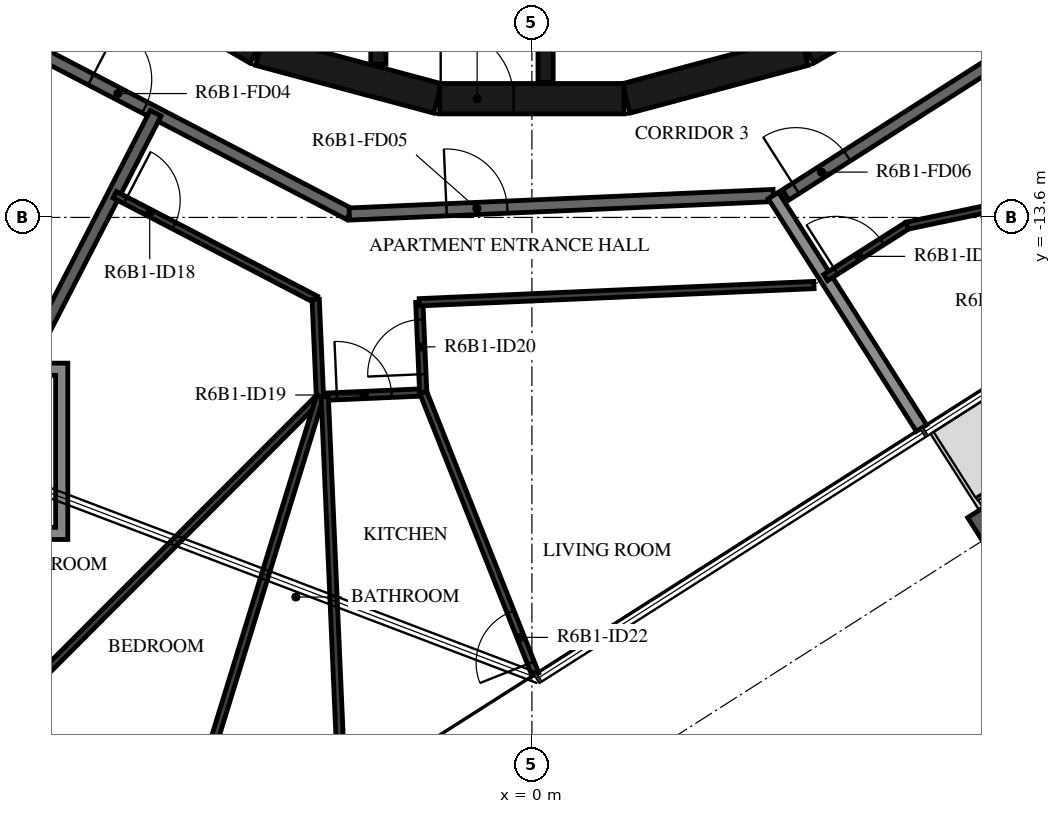
"""IFC4 building model, lengths in metres.
Left out: names, types, materials, properties, quantities, classifications, styles, units other than length and angle.
Written with IfcOpenShell. Run it as: python <this file> out.ifc"""

import sys

from ifc_helpers import new_model, si_unit, direction, frame, frame_2d, origin, origin_2d, place, context, subcontext, project, spatial, polyline, rectangle, i_section, outline, extrude, element, fill, save


model = new_model("IFC4")
c1 = context("Model", 3, precision=1e-05, world=origin(), true_north=direction((0.0, 1.0)))
c2 = subcontext(c1, "Body", "Model", "MODEL_VIEW")
j1 = project(units=[si_unit("LENGTHUNIT", "METRE"), si_unit("PLANEANGLEUNIT", "RADIAN")], contexts=[c1])
p1 = place(None, origin())
s1 = spatial("IfcSite", under=j1, at=p1, CompositionType="ELEMENT")
p2 = place(p1, origin())
s2 = spatial("IfcBuilding", under=s1, at=p2, CompositionType="ELEMENT")
p3 = place(p2, frame((0.0, 0.0, 237.2)))
s3 = spatial("IfcBuildingStorey", under=s2, at=p3, CompositionType="ELEMENT", Elevation=237.2)
p4 = place(p3, frame((7.535, -18.835, -0.38), z_axis=(0.0, 0.0, 1.0), x_axis=(-0.843391139633, -0.537300088953, 0.0)))
e1 = element("IfcColumn", 1, at=p4, inside=s3, PredefinedType="COLUMN", context=c2, shape_type="SweptSolid", body=[
    extrude(i_section(OverallWidth=0.3, OverallDepth=0.9, WebThickness=0.019, FlangeThickness=0.035, FilletRadius=0.03, at=origin_2d()), origin(), (0.0, 0.0, 1.0), 3.5),
])
p5 = place(p3, frame((1.55, -11.643, 0.0), z_axis=(0.0, 0.0, 1.0), x_axis=(0.965948410781, 0.258734743916, 0.0)))
e2 = element("IfcWall", 2, at=p5, inside=s3, PredefinedType="SHEAR", context=c2, shape_type="SweptSolid", body=[
    extrude(rectangle(XDim=3.033, YDim=0.5, at=frame_2d((1.516, 0.0))), origin(), (0.0, 0.0, 1.0), 3.12),
])
p6 = place(p3, frame((4.51, -10.845, 0.0), z_axis=(0.0, 0.0, 1.0), x_axis=(0.865975092491, 0.500087131594, 0.0)))
e3 = element("IfcWall", 3, at=p6, inside=s3, PredefinedType="SHEAR", context=c2, shape_type="SweptSolid", body=[
    extrude(rectangle(XDim=3.033, YDim=0.5, at=frame_2d((1.516, 0.0))), origin(), (0.0, 0.0, 1.0), 3.12),
])
p7 = place(p6, frame((1.066, 0.0, 0.0)))
e4 = element("IfcOpeningElement", 4, at=p7, cuts=e3, PredefinedType="OPENING", context=c2, shape_type="SweptSolid", body=[
    extrude(rectangle(XDim=0.9, YDim=2.1, at=frame_2d((0.45, 1.05))), frame((0.0, 0.26, 0.0), z_axis=(0.0, -1.0, 0.0), x_axis=(1.0, 0.0, 0.0)), (0.0, 0.0, 1.0), 0.52),
])
for number, where, z_axis, x_axis in (
    (5, (-7.137, -9.329, 0.0), (0.0, 0.0, 1.0), (0.866, -0.5, 0.0)),
    (6, (-4.479, -10.858, 0.0), (0.0, 0.0, 1.0), (0.966, -0.259, 0.0)),
):
    element("IfcWall", number, at=place(p3, frame(where, z_axis=z_axis, x_axis=x_axis)), inside=s3, PredefinedType="SHEAR", context=c2, shape_type="SweptSolid", body=[
        extrude(rectangle(XDim=3.033, YDim=0.5, at=frame_2d((1.516, 0.0))), origin(), (0.0, 0.0, 1.0), 3.12),
    ])
p8 = place(p3, frame((-1.516, -11.647, 0.0), z_axis=(0.0, 0.0, 1.0), x_axis=(1.0, 0.0, 0.0)))
e7 = element("IfcWall", 7, at=p8, inside=s3, PredefinedType="SHEAR", context=c2, shape_type="SweptSolid", body=[
    extrude(rectangle(XDim=3.033, YDim=0.5, at=frame_2d((1.516, 0.0))), origin(), (0.0, 0.0, 1.0), 3.12),
])
p9 = place(p8, frame((0.016, 0.0, 0.0)))
e8 = element("IfcOpeningElement", 8, at=p9, cuts=e7, PredefinedType="OPENING", context=c2, shape_type="SweptSolid", body=[
    extrude(rectangle(XDim=1.2, YDim=2.1, at=frame_2d((0.6, 1.05))), frame((0.0, 0.26, 0.0), z_axis=(0.0, -1.0, 0.0), x_axis=(1.0, 0.0, 0.0)), (0.0, 0.0, 1.0), 0.52),
])
p10 = place(p3, frame((-2.525, -8.97, 0.0), z_axis=(0.0, 0.0, 1.0), x_axis=(0.0, -1.0, 0.0)))
e9 = element("IfcWall", 9, at=p10, inside=s3, PredefinedType="SHEAR", context=c2, shape_type="SweptSolid", body=[
    extrude(rectangle(XDim=2.11, YDim=0.25, at=frame_2d((1.055, 0.0))), origin(), (0.0, 0.0, 1.0), 3.12),
])
p11 = place(p3, frame((0.225, -8.97, 0.0), z_axis=(0.0, 0.0, 1.0), x_axis=(0.0, -1.0, 0.0)))
e10 = element("IfcWall", 10, at=p11, inside=s3, PredefinedType="SHEAR", context=c2, shape_type="SweptSolid", body=[
    extrude(rectangle(XDim=2.41, YDim=0.25, at=frame_2d((1.205, 0.0))), origin(), (0.0, 0.0, 1.0), 3.12),
])
p12 = place(p3, frame((-9.372, -10.228, 0.0), z_axis=(0.0, 0.0, 1.0), x_axis=(0.887005184532, -0.461759464021, 0.0)))
e11 = element("IfcWall", 11, at=p12, inside=s3, PredefinedType="STANDARD", context=c2, shape_type="SweptSolid", body=[
    extrude(rectangle(XDim=7.181, YDim=0.2, at=frame_2d((3.591, 0.0))), origin(), (0.0, 0.0, 1.0), 3.12),
])
p13 = place(p12, frame((2.391, 0.0, 0.0)))
e12 = element("IfcOpeningElement", 12, at=p13, cuts=e11, PredefinedType="OPENING", context=c2, shape_type="SweptSolid", body=[
    extrude(rectangle(XDim=1.0, YDim=2.1, at=frame_2d((0.5, 1.05))), frame((0.0, 0.11, 0.0), z_axis=(0.0, -1.0, 0.0), x_axis=(1.0, 0.0, 0.0)), (0.0, 0.0, 1.0), 0.22),
])
p14 = place(p3, frame((-3.003, -13.544, 0.0), z_axis=(0.0, 0.0, 1.0), x_axis=(0.999048221872, 0.043619380718, 0.0)))
e13 = element("IfcWall", 13, at=p14, inside=s3, PredefinedType="STANDARD", context=c2, shape_type="SweptSolid", body=[
    extrude(rectangle(XDim=6.979, YDim=0.2, at=frame_2d((3.49, 0.0))), origin(), (0.0, 0.0, 1.0), 3.12),
])
p15 = place(p14, frame((1.6, 0.0, 0.0)))
e14 = element("IfcOpeningElement", 14, at=p15, cuts=e13, PredefinedType="OPENING", context=c2, shape_type="SweptSolid", body=[
    extrude(rectangle(XDim=1.0, YDim=2.1, at=frame_2d((0.5, 1.05))), frame((0.0, 0.11, 0.0), z_axis=(0.0, -1.0, 0.0), x_axis=(1.0, 0.0, 0.0)), (0.0, 0.0, 1.0), 0.22),
])
p16 = place(p3, frame((4.172, -13.231, 0.0), z_axis=(0.0, 0.0, 1.0), x_axis=(0.843388394728, 0.537304397561, 0.0)))
e15 = element("IfcWall", 15, at=p16, inside=s3, PredefinedType="STANDARD", context=c2, shape_type="SweptSolid", body=[
    extrude(rectangle(XDim=7.181, YDim=0.2, at=frame_2d((3.59, 0.0))), origin(), (0.0, 0.0, 1.0), 3.12),
])
p17 = place(p16, frame((0.2, 0.0, 0.0)))
e16 = element("IfcOpeningElement", 16, at=p17, cuts=e15, PredefinedType="OPENING", context=c2, shape_type="SweptSolid", body=[
    extrude(rectangle(XDim=1.0, YDim=2.1, at=frame_2d((0.5, 1.05))), frame((0.0, 0.11, 0.0), z_axis=(0.0, -1.0, 0.0), x_axis=(1.0, 0.0, 0.0)), (0.0, 0.0, 1.0), 0.22),
])
p18 = place(p3, frame((-8.303, -15.996, 0.0), z_axis=(0.0, 0.0, 1.0), x_axis=(0.457702371186, 0.889105471477, 0.0)))
e17 = element("IfcWall", 17, at=p18, inside=s3, PredefinedType="STANDARD", context=c2, shape_type="SweptSolid", body=[
    extrude(rectangle(XDim=4.623, YDim=0.2, at=frame_2d((2.312, 0.0))), origin(), (0.0, 0.0, 1.0), 3.12),
])
p19 = place(p3, frame((6.407, -17.064, 0.0), z_axis=(0.0, 0.0, 1.0), x_axis=(-0.537324777979, 0.843375410461, 0.0)))
e18 = element("IfcWall", 18, at=p19, inside=s3, PredefinedType="STANDARD", context=c2, shape_type="SweptSolid", body=[
    extrude(rectangle(XDim=4.535, YDim=0.2, at=frame_2d((2.268, 0.0))), origin(), (0.0, 0.0, 1.0), 2.73),
])
p20 = place(p3, frame((-6.861, -13.226, 0.0), z_axis=(0.0, 0.0, 1.0), x_axis=(0.887010791097, -0.461748694073, 0.0)))
e19 = element("IfcWall", 19, at=p20, inside=s3, PredefinedType="PARTITIONING", context=c2, shape_type="SweptSolid", body=[
    extrude(rectangle(XDim=3.727, YDim=0.12, at=frame_2d((1.864, 0.0))), origin(), (0.0, 0.0, 1.0), 3.12),
])
p21 = place(p20, frame((0.2, 0.0, 0.0)))
e20 = element("IfcOpeningElement", 20, at=p21, cuts=e19, PredefinedType="OPENING", context=c2, shape_type="SweptSolid", body=[
    extrude(rectangle(XDim=0.9, YDim=2.1, at=frame_2d((0.45, 1.05))), frame((0.0, 0.07, 0.0), z_axis=(0.0, -1.0, 0.0), x_axis=(1.0, 0.0, 0.0)), (0.0, 0.0, 1.0), 0.14),
])
p22 = place(p3, frame((-3.555, -14.947, 0.0), z_axis=(0.0, 0.0, 1.0), x_axis=(0.043470204022, -0.999054723908, 0.0)))
e21 = element("IfcWall", 21, at=p22, inside=s3, PredefinedType="PARTITIONING", context=c2, shape_type="SweptSolid", body=[
    extrude(rectangle(XDim=1.606, YDim=0.12, at=frame_2d((0.803, 0.0))), origin(), (0.0, 0.0, 1.0), 3.12),
])
p23 = place(p3, frame((-3.407, -16.548, 0.0), z_axis=(0.0, 0.0, 1.0), x_axis=(0.999045901572, 0.043672491929, 0.0)))
e22 = element("IfcWall", 22, at=p23, inside=s3, PredefinedType="PARTITIONING", context=c2, shape_type="SweptSolid", body=[
    extrude(rectangle(XDim=1.621, YDim=0.12, at=frame_2d((0.811, 0.0))), origin(), (0.0, 0.0, 1.0), 3.12),
])
p24 = place(p23, frame((0.2, 0.0, 0.0)))
e23 = element("IfcOpeningElement", 23, at=p24, cuts=e22, PredefinedType="OPENING", context=c2, shape_type="SweptSolid", body=[
    extrude(rectangle(XDim=0.9, YDim=2.1, at=frame_2d((0.45, 1.05))), frame((0.0, 0.07, 0.0), z_axis=(0.0, -1.0, 0.0), x_axis=(1.0, 0.0, 0.0)), (0.0, 0.0, 1.0), 0.14),
])
p25 = place(p3, frame((-1.787, -16.478, 0.0), z_axis=(0.0, 0.0, 1.0), x_axis=(-0.043601447011, 0.999049004713, 0.0)))
e24 = element("IfcWall", 24, at=p25, inside=s3, PredefinedType="PARTITIONING", context=c2, shape_type="SweptSolid", body=[
    extrude(rectangle(XDim=1.484, YDim=0.12, at=frame_2d((0.742, 0.0))), origin(), (0.0, 0.0, 1.0), 3.12),
])
p26 = place(p25, frame((0.3, 0.0, 0.0)))
e25 = element("IfcOpeningElement", 25, at=p26, cuts=e24, PredefinedType="OPENING", context=c2, shape_type="SweptSolid", body=[
    extrude(rectangle(XDim=0.9, YDim=2.1, at=frame_2d((0.45, 1.05))), frame((0.0, 0.07, 0.0), z_axis=(0.0, -1.0, 0.0), x_axis=(1.0, 0.0, 0.0)), (0.0, 0.0, 1.0), 0.14),
])
p27 = place(p3, frame((-1.852, -14.995, 0.0), z_axis=(0.0, 0.0, 1.0), x_axis=(0.999047773092, 0.043629658249, 0.0)))
e26 = element("IfcWall", 26, at=p27, inside=s3, PredefinedType="PARTITIONING", context=c2, shape_type="SweptSolid", body=[
    extrude(rectangle(XDim=6.497, YDim=0.12, at=frame_2d((3.248, 0.0))), origin(), (0.0, 0.0, 1.0), 3.12),
])
p28 = place(p3, frame((-11.862, -24.94, 0.0), z_axis=(0.0, 0.0, 1.0), x_axis=(0.70663293894, 0.707580306117, 0.0)))
e27 = element("IfcWall", 27, at=p28, inside=s3, PredefinedType="PARTITIONING", context=c2, shape_type="SweptSolid", body=[
    extrude(rectangle(XDim=11.854, YDim=0.12, at=frame_2d((5.927, 0.0))), origin(), (0.0, 0.0, 1.0), 3.12),
])
p29 = place(p28, frame((1.9, 0.0, 0.0)))
e28 = element("IfcOpeningElement", 28, at=p29, cuts=e27, PredefinedType="OPENING", context=c2, shape_type="SweptSolid", body=[
    extrude(rectangle(XDim=0.9, YDim=2.1, at=frame_2d((0.45, 1.05))), frame((0.0, 0.07, 0.0), z_axis=(0.0, -1.0, 0.0), x_axis=(1.0, 0.0, 0.0)), (0.0, 0.0, 1.0), 0.14),
])
p30 = place(p3, frame((-6.026, -24.795, 0.0), z_axis=(0.0, 0.0, 1.0), x_axis=(0.294501505058, 0.955651015548, 0.0)))
e29 = element("IfcWall", 29, at=p30, inside=s3, PredefinedType="PARTITIONING", context=c2, shape_type="SweptSolid", body=[
    extrude(rectangle(XDim=8.626, YDim=0.12, at=frame_2d((4.313, 0.0))), origin(), (0.0, 0.0, 1.0), 3.12),
])
p31 = place(p30, frame((0.7, 0.0, 0.0)))
e30 = element("IfcOpeningElement", 30, at=p31, cuts=e29, PredefinedType="OPENING", context=c2, shape_type="SweptSolid", body=[
    extrude(rectangle(XDim=0.8, YDim=2.1, at=frame_2d((0.4, 1.05))), frame((0.0, 0.07, 0.0), z_axis=(0.0, -1.0, 0.0), x_axis=(1.0, 0.0, 0.0)), (0.0, 0.0, 1.0), 0.14),
])
p32 = place(p3, frame((-3.119, -23.133, 0.0), z_axis=(0.0, 0.0, 1.0), x_axis=(-0.043633326708, 0.99904761288, 0.0)))
e31 = element("IfcWall", 31, at=p32, inside=s3, PredefinedType="PARTITIONING", context=c2, shape_type="SweptSolid", body=[
    extrude(rectangle(XDim=6.591, YDim=0.12, at=frame_2d((3.296, 0.0))), origin(), (0.0, 0.0, 1.0), 3.12),
])
p33 = place(p3, frame((0.056, -21.11, 0.0), z_axis=(0.0, 0.0, 1.0), x_axis=(-0.369701541807, 0.929150563679, 0.0)))
e32 = element("IfcWall", 32, at=p33, inside=s3, PredefinedType="PARTITIONING", context=c2, shape_type="SweptSolid", body=[
    extrude(rectangle(XDim=4.986, YDim=0.12, at=frame_2d((2.493, 0.0))), origin(), (0.0, 0.0, 1.0), 2.73),
])
p34 = place(p33, frame((0.2, 0.0, 0.0)))
e33 = element("IfcOpeningElement", 33, at=p34, cuts=e32, PredefinedType="OPENING", context=c2, shape_type="SweptSolid", body=[
    extrude(rectangle(XDim=0.9, YDim=2.1, at=frame_2d((0.45, 1.05))), frame((0.0, 0.07, 0.0), z_axis=(0.0, -1.0, 0.0), x_axis=(1.0, 0.0, 0.0)), (0.0, 0.0, 1.0), 0.14),
])
p35 = place(p3, frame((4.83, -14.59, 0.0), z_axis=(0.0, 0.0, 1.0), x_axis=(0.843395898817, 0.537292618467, 0.0)))
e34 = element("IfcWall", 34, at=p35, inside=s3, PredefinedType="PARTITIONING", context=c2, shape_type="SweptSolid", body=[
    extrude(rectangle(XDim=1.59, YDim=0.12, at=frame_2d((0.795, 0.0))), origin(), (0.0, 0.0, 1.0), 3.12),
])
p36 = place(p35, frame((0.2, 0.0, 0.0)))
e35 = element("IfcOpeningElement", 35, at=p36, cuts=e34, PredefinedType="OPENING", context=c2, shape_type="SweptSolid", body=[
    extrude(rectangle(XDim=0.9, YDim=2.1, at=frame_2d((0.45, 1.05))), frame((0.0, 0.07, 0.0), z_axis=(0.0, -1.0, 0.0), x_axis=(1.0, 0.0, 0.0)), (0.0, 0.0, 1.0), 0.14),
])
p37 = place(p3, frame((6.172, -13.735, 0.0), z_axis=(0.0, 0.0, 1.0), x_axis=(0.978659442958, 0.205488916271, 0.0)))
e36 = element("IfcWall", 36, at=p37, inside=s3, PredefinedType="PARTITIONING", context=c2, shape_type="SweptSolid", body=[
    extrude(rectangle(XDim=1.817, YDim=0.12, at=frame_2d((0.908, 0.0))), origin(), (0.0, 0.0, 1.0), 3.12),
])
p38 = place(p3, origin())
e37 = element("IfcWall", 37, at=p38, inside=s3, PredefinedType="STANDARD", context=c2, shape_type="SweptSolid", body=[
    extrude(outline(polyline([(-7.632, -15.996), (-7.632, -18.896), (-10.532, -18.896), (-10.532, -15.996), (-7.632, -15.996)]), holes=[polyline([(-10.332, -18.696), (-7.832, -18.696), (-7.832, -16.196), (-10.332, -16.196), (-10.332, -18.696)])]), origin(), (0.0, 0.0, 1.0), 3.12),
])
p39 = place(p9, origin())
e38 = element("IfcDoor", 38, at=p39, inside=s3, OperationType="SINGLE_SWING_RIGHT", PredefinedType="DOOR", context=c2, shape_type="SweptSolid", body=[
    extrude(rectangle(XDim=1.2, YDim=2.1, at=frame_2d((0.6, 1.05))), frame((0.0, 0.025, 0.0), z_axis=(0.0, -1.0, 0.0), x_axis=(1.0, 0.0, 0.0)), (0.0, 0.0, 1.0), 0.05),
])
fill(e8, e38)
p40 = place(p13, origin())
e39 = element("IfcDoor", 39, at=p40, inside=s3, OperationType="SINGLE_SWING_RIGHT", PredefinedType="DOOR", context=c2, shape_type="SweptSolid", body=[
    extrude(rectangle(XDim=1.0, YDim=2.1, at=frame_2d((0.5, 1.05))), frame((0.0, 0.025, 0.0), z_axis=(0.0, -1.0, 0.0), x_axis=(1.0, 0.0, 0.0)), (0.0, 0.0, 1.0), 0.05),
])
fill(e12, e39)
p41 = place(p15, origin())
e40 = element("IfcDoor", 40, at=p41, inside=s3, OperationType="SINGLE_SWING_LEFT", PredefinedType="DOOR", context=c2, shape_type="SweptSolid", body=[
    extrude(rectangle(XDim=1.0, YDim=2.1, at=frame_2d((0.5, 1.05))), frame((0.0, 0.025, 0.0), z_axis=(0.0, -1.0, 0.0), x_axis=(1.0, 0.0, 0.0)), (0.0, 0.0, 1.0), 0.05),
])
fill(e14, e40)
p42 = place(p21, origin())
e41 = element("IfcDoor", 41, at=p42, inside=s3, OperationType="SINGLE_SWING_LEFT", PredefinedType="DOOR", context=c2, shape_type="SweptSolid", body=[
    extrude(rectangle(XDim=0.9, YDim=2.1, at=frame_2d((0.45, 1.05))), frame((0.0, 0.025, 0.0), z_axis=(0.0, -1.0, 0.0), x_axis=(1.0, 0.0, 0.0)), (0.0, 0.0, 1.0), 0.05),
])
fill(e20, e41)
p43 = place(p24, origin())
e42 = element("IfcDoor", 42, at=p43, inside=s3, OperationType="SINGLE_SWING_LEFT", PredefinedType="DOOR", context=c2, shape_type="SweptSolid", body=[
    extrude(rectangle(XDim=0.9, YDim=2.1, at=frame_2d((0.45, 1.05))), frame((0.0, 0.025, 0.0), z_axis=(0.0, -1.0, 0.0), x_axis=(1.0, 0.0, 0.0)), (0.0, 0.0, 1.0), 0.05),
])
fill(e23, e42)
p44 = place(p26, origin())
e43 = element("IfcDoor", 43, at=p44, inside=s3, OperationType="SINGLE_SWING_LEFT", PredefinedType="DOOR", context=c2, shape_type="SweptSolid", body=[
    extrude(rectangle(XDim=0.9, YDim=2.1, at=frame_2d((0.45, 1.05))), frame((0.0, 0.025, 0.0), z_axis=(0.0, -1.0, 0.0), x_axis=(1.0, 0.0, 0.0)), (0.0, 0.0, 1.0), 0.05),
])
fill(e25, e43)
p45 = place(p34, origin())
e44 = element("IfcDoor", 44, at=p45, inside=s3, OperationType="SINGLE_SWING_LEFT", PredefinedType="DOOR", context=c2, shape_type="SweptSolid", body=[
    extrude(rectangle(XDim=0.9, YDim=2.1, at=frame_2d((0.45, 1.05))), frame((0.0, 0.025, 0.0), z_axis=(0.0, -1.0, 0.0), x_axis=(1.0, 0.0, 0.0)), (0.0, 0.0, 1.0), 0.05),
])
fill(e33, e44)
p46 = place(p17, origin())
e45 = element("IfcDoor", 45, at=p46, inside=s3, OperationType="SINGLE_SWING_LEFT", PredefinedType="DOOR", context=c2, shape_type="SweptSolid", body=[
    extrude(rectangle(XDim=1.0, YDim=2.1, at=frame_2d((0.5, 1.05))), frame((0.0, 0.025, 0.0), z_axis=(0.0, -1.0, 0.0), x_axis=(1.0, 0.0, 0.0)), (0.0, 0.0, 1.0), 0.05),
])
fill(e16, e45)
p47 = place(p36, origin())
e46 = element("IfcDoor", 46, at=p47, inside=s3, OperationType="SINGLE_SWING_LEFT", PredefinedType="DOOR", context=c2, shape_type="SweptSolid", body=[
    extrude(rectangle(XDim=0.9, YDim=2.1, at=frame_2d((0.45, 1.05))), frame((0.0, 0.025, 0.0), z_axis=(0.0, -1.0, 0.0), x_axis=(1.0, 0.0, 0.0)), (0.0, 0.0, 1.0), 0.05),
])
fill(e35, e46)
save(model, sys.argv[1])
